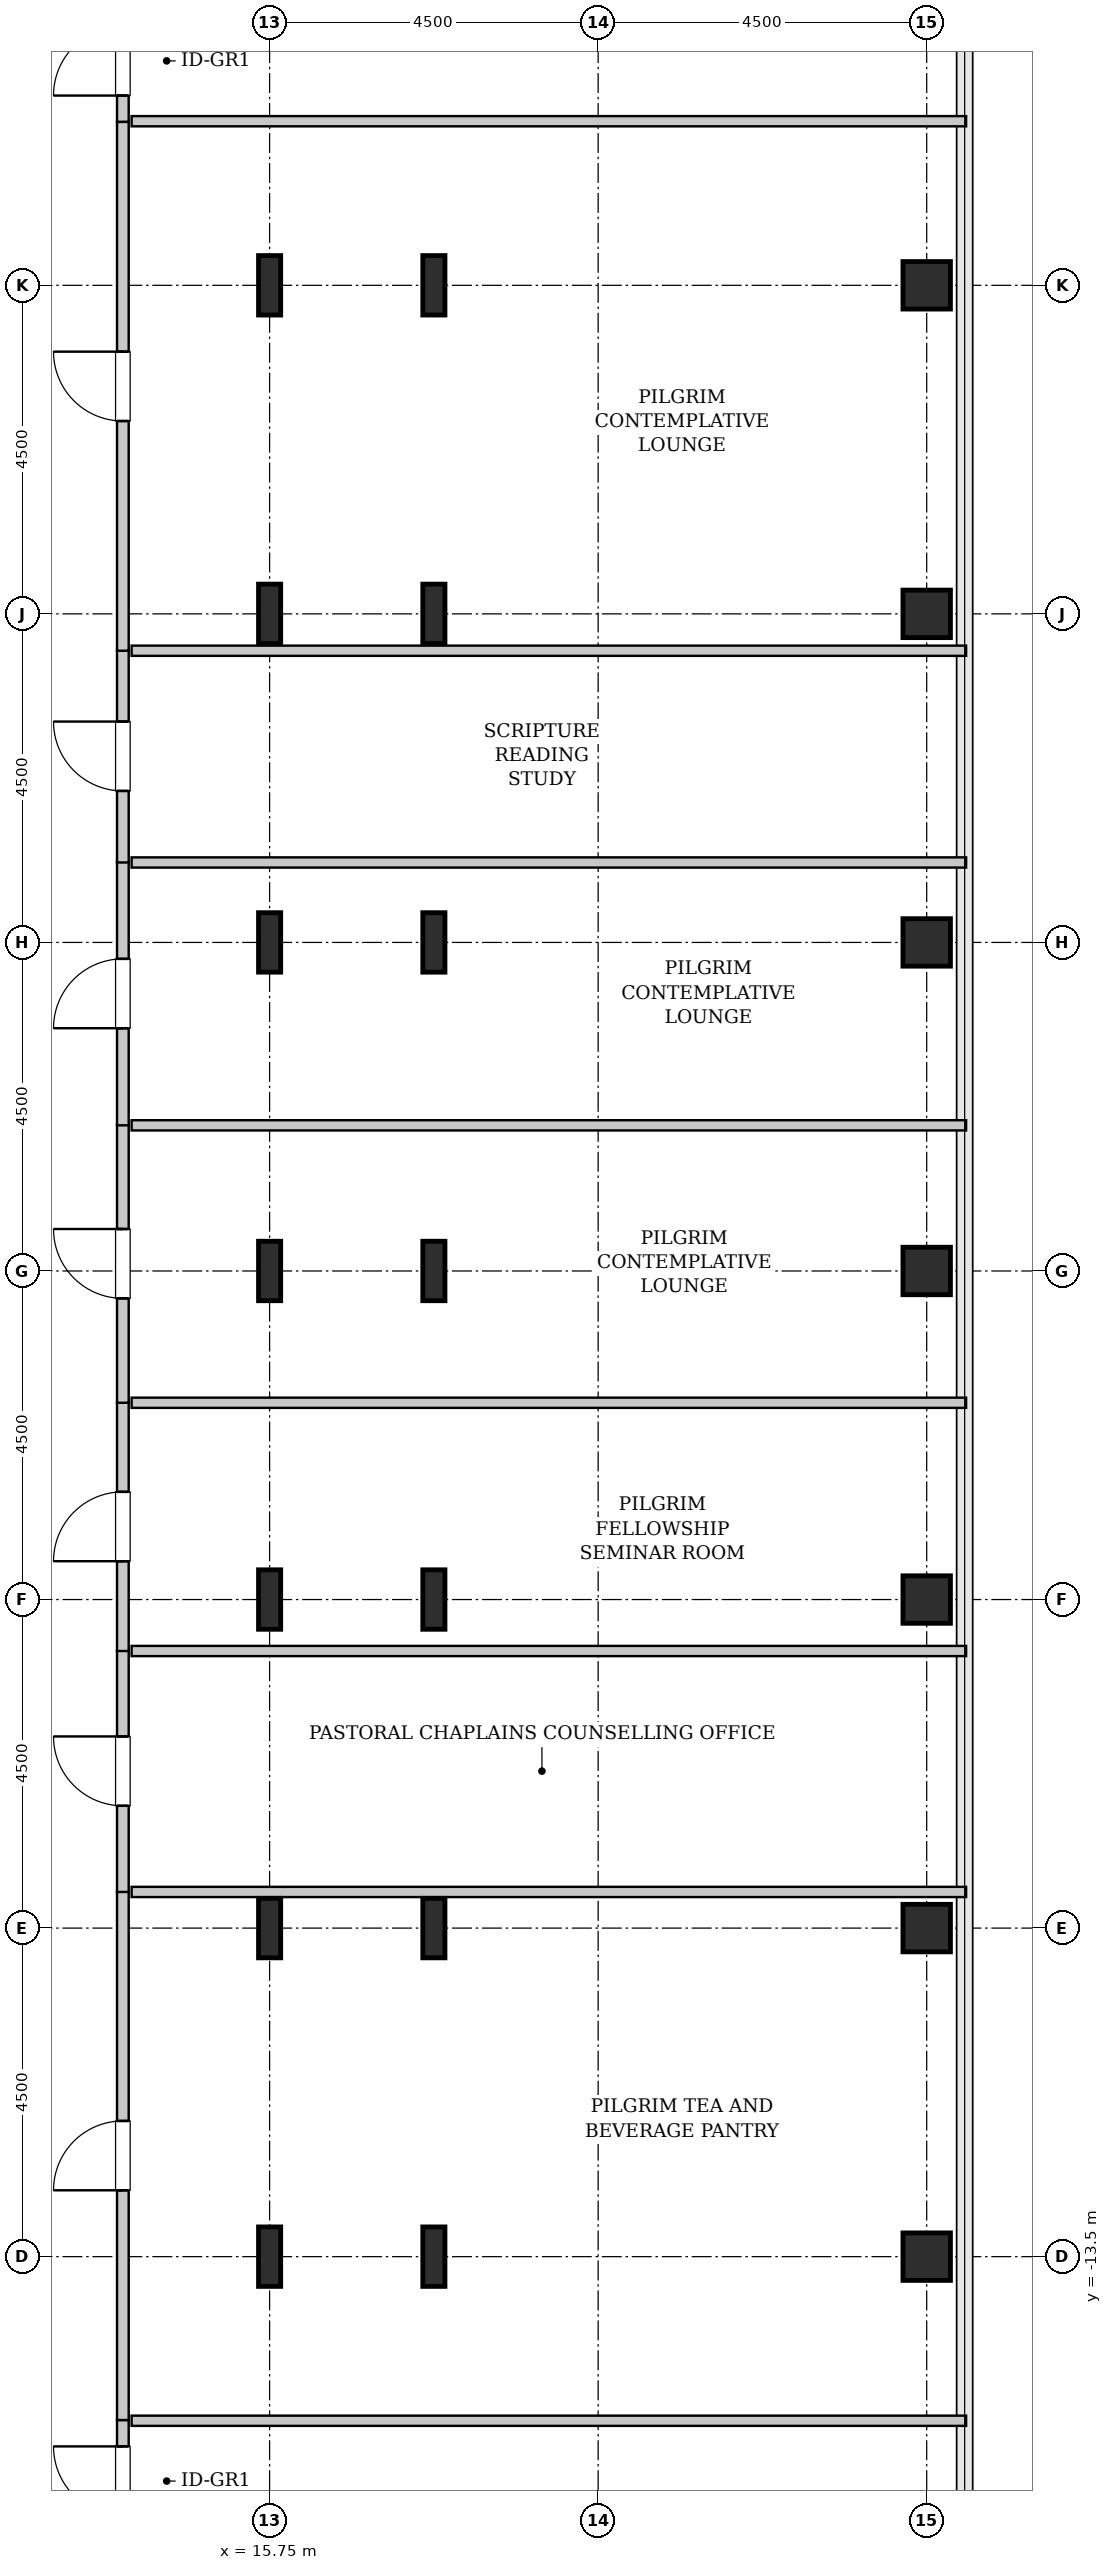
"""IFC4 building model, lengths in metres.
Left out: names, types, materials, properties, quantities, classifications, styles, units other than length and angle.
Written with IfcOpenShell. Run it as: python <this file> out.ifc"""

import sys

from ifc_helpers import new_model, si_unit, direction, frame, frame_2d, origin, origin_2d, place, context, subcontext, project, spatial, rectangle, hollow_rectangle, i_section, extrude, source, transform, mapped, element, fill, save


model = new_model("IFC4")
c1 = context("Model", 3, precision=1e-05, world=origin(), true_north=direction((0.0, 1.0)))
c2 = subcontext(c1, "Body", "Model", "MODEL_VIEW")
j1 = project(units=[si_unit("LENGTHUNIT", "METRE"), si_unit("PLANEANGLEUNIT", "RADIAN")], contexts=[c1])
p1 = place(None, origin())
s1 = spatial("IfcSite", under=j1, at=p1, CompositionType="ELEMENT")
p2 = place(p1, origin())
s2 = spatial("IfcBuilding", under=s1, at=p2, CompositionType="ELEMENT")
p3 = place(p2, frame((0.0, 0.0, 256.0)))
s3 = spatial("IfcBuildingStorey", under=s2, at=p3, CompositionType="ELEMENT", Elevation=256.0)
m1 = source(origin(), c2, "Body", "SweptSolid", [
    extrude(i_section(OverallWidth=0.303, OverallDepth=0.814, WebThickness=0.021, FlangeThickness=0.04, FilletRadius=0.03, at=origin_2d()), origin(), (0.0, 0.0, 1.0), 3.8),
])
for number, where, z_axis, x_axis in (
    (1, (15.75, -13.5, 0.0), (0.0, 0.0, 1.0), (1.0, 0.0, 0.0)),
    (2, (15.75, -9.0, 0.0), (0.0, 0.0, 1.0), (1.0, 0.0, 0.0)),
    (3, (15.75, -4.5, 0.0), (0.0, 0.0, 1.0), (1.0, 0.0, 0.0)),
    (4, (15.75, 0.0, 0.0), (0.0, 0.0, 1.0), (1.0, 0.0, 0.0)),
    (5, (15.75, 4.5, 0.0), (0.0, 0.0, 1.0), (1.0, 0.0, 0.0)),
    (6, (15.75, 9.0, 0.0), (0.0, 0.0, 1.0), (1.0, 0.0, 0.0)),
    (7, (15.75, 13.5, 0.0), (0.0, 0.0, 1.0), (1.0, 0.0, 0.0)),
    (8, (18.0, -13.5, 0.0), (0.0, 0.0, 1.0), (1.0, 0.0, 0.0)),
    (9, (18.0, -9.0, 0.0), (0.0, 0.0, 1.0), (1.0, 0.0, 0.0)),
    (10, (18.0, -4.5, 0.0), (0.0, 0.0, 1.0), (1.0, 0.0, 0.0)),
    (11, (18.0, 0.0, 0.0), (0.0, 0.0, 1.0), (1.0, 0.0, 0.0)),
    (12, (18.0, 4.5, 0.0), (0.0, 0.0, 1.0), (1.0, 0.0, 0.0)),
    (13, (18.0, 9.0, 0.0), (0.0, 0.0, 1.0), (1.0, 0.0, 0.0)),
    (14, (18.0, 13.5, 0.0), (0.0, 0.0, 1.0), (1.0, 0.0, 0.0)),
):
    element("IfcColumn", number, at=place(p3, frame(where, z_axis=z_axis, x_axis=x_axis)), inside=s3, PredefinedType="COLUMN", context=c2, shape_type="MappedRepresentation", body=[
        mapped(m1, transform((0.0, 0.0, 0.0), x_axis=(1.0, 0.0, 0.0), y_axis=(0.0, 1.0, 0.0), z_axis=(0.0, 0.0, 1.0), scale=1.0)),
    ])
m2 = source(origin(), c2, "Body", "SweptSolid", [
    extrude(hollow_rectangle(XDim=0.65, YDim=0.65, WallThickness=0.032, InnerFilletRadius=0.032, OuterFilletRadius=0.064, at=origin_2d()), origin(), (0.0, 0.0, 1.0), 3.8),
])
for number, where, z_axis, x_axis in (
    (15, (24.75, -13.5, 0.0), (0.0, 0.0, 1.0), (1.0, 0.0, 0.0)),
    (16, (24.75, -9.0, 0.0), (0.0, 0.0, 1.0), (1.0, 0.0, 0.0)),
    (17, (24.75, -4.5, 0.0), (0.0, 0.0, 1.0), (1.0, 0.0, 0.0)),
    (18, (24.75, 0.0, 0.0), (0.0, 0.0, 1.0), (1.0, 0.0, 0.0)),
    (19, (24.75, 4.5, 0.0), (0.0, 0.0, 1.0), (1.0, 0.0, 0.0)),
    (20, (24.75, 9.0, 0.0), (0.0, 0.0, 1.0), (1.0, 0.0, 0.0)),
    (21, (24.75, 13.5, 0.0), (0.0, 0.0, 1.0), (1.0, 0.0, 0.0)),
):
    element("IfcColumn", number, at=place(p3, frame(where, z_axis=z_axis, x_axis=x_axis)), inside=s3, PredefinedType="COLUMN", context=c2, shape_type="MappedRepresentation", body=[
        mapped(m2, transform((0.0, 0.0, 0.0), x_axis=(1.0, 0.0, 0.0), y_axis=(0.0, 1.0, 0.0), z_axis=(0.0, 0.0, 1.0), scale=1.0)),
    ])
m3 = source(origin(), c2, "Body", "SweptSolid", [
    extrude(rectangle(XDim=7.302, YDim=0.16, at=frame_2d((3.651, 0.0))), origin(), (0.0, 0.0, 1.0), 3.485),
])
p4 = place(p3, frame((13.74, -23.04, 0.0), z_axis=(0.0, 0.0, 1.0), x_axis=(0.0, 1.0, 0.0)))
e22 = element("IfcWall", 22, at=p4, inside=s3, PredefinedType="PARTITIONING", context=c2, shape_type="MappedRepresentation", body=[
    mapped(m3, transform((0.0, 0.0, 0.0), x_axis=(1.0, 0.0, 0.0), y_axis=(0.0, 1.0, 0.0), z_axis=(0.0, 0.0, 1.0), scale=1.0)),
])
p5 = place(p4, frame((5.991, 0.0, 0.0)))
e23 = element("IfcOpeningElement", 23, at=p5, cuts=e22, PredefinedType="OPENING", context=c2, shape_type="SweptSolid", body=[
    extrude(rectangle(XDim=0.95, YDim=2.1, at=frame_2d((0.475, 1.05))), frame((0.0, 0.09, 0.0), z_axis=(0.0, -1.0, 0.0), x_axis=(1.0, 0.0, 0.0)), (0.0, 0.0, 1.0), 0.18),
])
m4 = source(origin(), c2, "Body", "SweptSolid", [
    extrude(rectangle(XDim=11.43, YDim=0.14, at=frame_2d((5.715, 0.0))), origin(), (0.0, 0.0, 1.0), 3.485),
])
p6 = place(p3, frame((13.86, -15.748, 0.0), z_axis=(0.0, 0.0, 1.0), x_axis=(1.0, 0.0, 0.0)))
e24 = element("IfcWall", 24, at=p6, inside=s3, PredefinedType="PARTITIONING", context=c2, shape_type="MappedRepresentation", body=[
    mapped(m4, transform((0.0, 0.0, 0.0), x_axis=(1.0, 0.0, 0.0), y_axis=(0.0, 1.0, 0.0), z_axis=(0.0, 0.0, 1.0), scale=1.0)),
])
m5 = source(origin(), c2, "Body", "SweptSolid", [
    extrude(rectangle(XDim=7.242, YDim=0.16, at=frame_2d((3.621, 0.0))), origin(), (0.0, 0.0, 1.0), 3.485),
])
p7 = place(p3, frame((13.74, -15.738, 0.0), z_axis=(0.0, 0.0, 1.0), x_axis=(0.0, 1.0, 0.0)))
e25 = element("IfcWall", 25, at=p7, inside=s3, PredefinedType="PARTITIONING", context=c2, shape_type="MappedRepresentation", body=[
    mapped(m5, transform((0.0, 0.0, 0.0), x_axis=(1.0, 0.0, 0.0), y_axis=(0.0, 1.0, 0.0), z_axis=(0.0, 0.0, 1.0), scale=1.0)),
])
p8 = place(p7, frame((3.146, 0.0, 0.0)))
e26 = element("IfcOpeningElement", 26, at=p8, cuts=e25, PredefinedType="OPENING", context=c2, shape_type="SweptSolid", body=[
    extrude(rectangle(XDim=0.95, YDim=2.1, at=frame_2d((0.475, 1.05))), frame((0.0, 0.09, 0.0), z_axis=(0.0, -1.0, 0.0), x_axis=(1.0, 0.0, 0.0)), (0.0, 0.0, 1.0), 0.18),
])
m6 = source(origin(), c2, "Body", "SweptSolid", [
    extrude(rectangle(XDim=11.43, YDim=0.14, at=frame_2d((5.715, 0.0))), origin(), (0.0, 0.0, 1.0), 2.875),
])
p9 = place(p3, frame((13.86, -8.505, 0.0), z_axis=(0.0, 0.0, 1.0), x_axis=(1.0, 0.0, 0.0)))
e27 = element("IfcWall", 27, at=p9, inside=s3, PredefinedType="PARTITIONING", context=c2, shape_type="MappedRepresentation", body=[
    mapped(m6, transform((0.0, 0.0, 0.0), x_axis=(1.0, 0.0, 0.0), y_axis=(0.0, 1.0, 0.0), z_axis=(0.0, 0.0, 1.0), scale=1.0)),
])
m7 = source(origin(), c2, "Body", "SweptSolid", [
    extrude(rectangle(XDim=3.31, YDim=0.16, at=frame_2d((1.655, 0.0))), origin(), (0.0, 0.0, 1.0), 3.485),
])
p10 = place(p3, frame((13.74, -8.505, 0.0), z_axis=(0.0, 0.0, 1.0), x_axis=(0.0, 1.0, 0.0)))
e28 = element("IfcWall", 28, at=p10, inside=s3, PredefinedType="PARTITIONING", context=c2, shape_type="MappedRepresentation", body=[
    mapped(m7, transform((0.0, 0.0, 0.0), x_axis=(1.0, 0.0, 0.0), y_axis=(0.0, 1.0, 0.0), z_axis=(0.0, 0.0, 1.0), scale=1.0)),
])
p11 = place(p10, frame((1.18, 0.0, 0.0)))
e29 = element("IfcOpeningElement", 29, at=p11, cuts=e28, PredefinedType="OPENING", context=c2, shape_type="SweptSolid", body=[
    extrude(rectangle(XDim=0.95, YDim=2.1, at=frame_2d((0.475, 1.05))), frame((0.0, 0.09, 0.0), z_axis=(0.0, -1.0, 0.0), x_axis=(1.0, 0.0, 0.0)), (0.0, 0.0, 1.0), 0.18),
])
p12 = place(p3, frame((13.86, -5.205, 0.0), z_axis=(0.0, 0.0, 1.0), x_axis=(1.0, 0.0, 0.0)))
e30 = element("IfcWall", 30, at=p12, inside=s3, PredefinedType="PARTITIONING", context=c2, shape_type="MappedRepresentation", body=[
    mapped(m4, transform((0.0, 0.0, 0.0), x_axis=(1.0, 0.0, 0.0), y_axis=(0.0, 1.0, 0.0), z_axis=(0.0, 0.0, 1.0), scale=1.0)),
])
m8 = source(origin(), c2, "Body", "SweptSolid", [
    extrude(rectangle(XDim=3.41, YDim=0.16, at=frame_2d((1.705, 0.0))), origin(), (0.0, 0.0, 1.0), 3.485),
])
p13 = place(p3, frame((13.74, -5.205, 0.0), z_axis=(0.0, 0.0, 1.0), x_axis=(0.0, 1.0, 0.0)))
e31 = element("IfcWall", 31, at=p13, inside=s3, PredefinedType="PARTITIONING", context=c2, shape_type="MappedRepresentation", body=[
    mapped(m8, transform((0.0, 0.0, 0.0), x_axis=(1.0, 0.0, 0.0), y_axis=(0.0, 1.0, 0.0), z_axis=(0.0, 0.0, 1.0), scale=1.0)),
])
p14 = place(p13, frame((1.23, 0.0, 0.0)))
e32 = element("IfcOpeningElement", 32, at=p14, cuts=e31, PredefinedType="OPENING", context=c2, shape_type="SweptSolid", body=[
    extrude(rectangle(XDim=0.95, YDim=2.1, at=frame_2d((0.475, 1.05))), frame((0.0, 0.09, 0.0), z_axis=(0.0, -1.0, 0.0), x_axis=(1.0, 0.0, 0.0)), (0.0, 0.0, 1.0), 0.18),
])
p15 = place(p3, frame((13.86, -1.805, 0.0), z_axis=(0.0, 0.0, 1.0), x_axis=(1.0, 0.0, 0.0)))
e33 = element("IfcWall", 33, at=p15, inside=s3, PredefinedType="PARTITIONING", context=c2, shape_type="MappedRepresentation", body=[
    mapped(m4, transform((0.0, 0.0, 0.0), x_axis=(1.0, 0.0, 0.0), y_axis=(0.0, 1.0, 0.0), z_axis=(0.0, 0.0, 1.0), scale=1.0)),
])
m9 = source(origin(), c2, "Body", "SweptSolid", [
    extrude(rectangle(XDim=3.81, YDim=0.16, at=frame_2d((1.905, 0.0))), origin(), (0.0, 0.0, 1.0), 3.485),
])
p16 = place(p3, frame((13.74, -1.805, 0.0), z_axis=(0.0, 0.0, 1.0), x_axis=(0.0, 1.0, 0.0)))
e34 = element("IfcWall", 34, at=p16, inside=s3, PredefinedType="PARTITIONING", context=c2, shape_type="MappedRepresentation", body=[
    mapped(m9, transform((0.0, 0.0, 0.0), x_axis=(1.0, 0.0, 0.0), y_axis=(0.0, 1.0, 0.0), z_axis=(0.0, 0.0, 1.0), scale=1.0)),
])
p17 = place(p16, frame((1.43, 0.0, 0.0)))
e35 = element("IfcOpeningElement", 35, at=p17, cuts=e34, PredefinedType="OPENING", context=c2, shape_type="SweptSolid", body=[
    extrude(rectangle(XDim=0.95, YDim=2.1, at=frame_2d((0.475, 1.05))), frame((0.0, 0.09, 0.0), z_axis=(0.0, -1.0, 0.0), x_axis=(1.0, 0.0, 0.0)), (0.0, 0.0, 1.0), 0.18),
])
p18 = place(p3, frame((13.86, 1.995, 0.0), z_axis=(0.0, 0.0, 1.0), x_axis=(1.0, 0.0, 0.0)))
e36 = element("IfcWall", 36, at=p18, inside=s3, PredefinedType="PARTITIONING", context=c2, shape_type="MappedRepresentation", body=[
    mapped(m4, transform((0.0, 0.0, 0.0), x_axis=(1.0, 0.0, 0.0), y_axis=(0.0, 1.0, 0.0), z_axis=(0.0, 0.0, 1.0), scale=1.0)),
])
m10 = source(origin(), c2, "Body", "SweptSolid", [
    extrude(rectangle(XDim=3.61, YDim=0.16, at=frame_2d((1.805, 0.0))), origin(), (0.0, 0.0, 1.0), 3.485),
])
p19 = place(p3, frame((13.74, 1.995, 0.0), z_axis=(0.0, 0.0, 1.0), x_axis=(0.0, 1.0, 0.0)))
e37 = element("IfcWall", 37, at=p19, inside=s3, PredefinedType="PARTITIONING", context=c2, shape_type="MappedRepresentation", body=[
    mapped(m10, transform((0.0, 0.0, 0.0), x_axis=(1.0, 0.0, 0.0), y_axis=(0.0, 1.0, 0.0), z_axis=(0.0, 0.0, 1.0), scale=1.0)),
])
p20 = place(p19, frame((1.33, 0.0, 0.0)))
e38 = element("IfcOpeningElement", 38, at=p20, cuts=e37, PredefinedType="OPENING", context=c2, shape_type="SweptSolid", body=[
    extrude(rectangle(XDim=0.95, YDim=2.1, at=frame_2d((0.475, 1.05))), frame((0.0, 0.09, 0.0), z_axis=(0.0, -1.0, 0.0), x_axis=(1.0, 0.0, 0.0)), (0.0, 0.0, 1.0), 0.18),
])
p21 = place(p3, frame((13.86, 5.595, 0.0), z_axis=(0.0, 0.0, 1.0), x_axis=(1.0, 0.0, 0.0)))
e39 = element("IfcWall", 39, at=p21, inside=s3, PredefinedType="PARTITIONING", context=c2, shape_type="MappedRepresentation", body=[
    mapped(m4, transform((0.0, 0.0, 0.0), x_axis=(1.0, 0.0, 0.0), y_axis=(0.0, 1.0, 0.0), z_axis=(0.0, 0.0, 1.0), scale=1.0)),
])
m11 = source(origin(), c2, "Body", "SweptSolid", [
    extrude(rectangle(XDim=2.91, YDim=0.16, at=frame_2d((1.455, 0.0))), origin(), (0.0, 0.0, 1.0), 3.485),
])
p22 = place(p3, frame((13.74, 5.595, 0.0), z_axis=(0.0, 0.0, 1.0), x_axis=(0.0, 1.0, 0.0)))
e40 = element("IfcWall", 40, at=p22, inside=s3, PredefinedType="PARTITIONING", context=c2, shape_type="MappedRepresentation", body=[
    mapped(m11, transform((0.0, 0.0, 0.0), x_axis=(1.0, 0.0, 0.0), y_axis=(0.0, 1.0, 0.0), z_axis=(0.0, 0.0, 1.0), scale=1.0)),
])
p23 = place(p22, frame((0.98, 0.0, 0.0)))
e41 = element("IfcOpeningElement", 41, at=p23, cuts=e40, PredefinedType="OPENING", context=c2, shape_type="SweptSolid", body=[
    extrude(rectangle(XDim=0.95, YDim=2.1, at=frame_2d((0.475, 1.05))), frame((0.0, 0.09, 0.0), z_axis=(0.0, -1.0, 0.0), x_axis=(1.0, 0.0, 0.0)), (0.0, 0.0, 1.0), 0.18),
])
p24 = place(p3, frame((13.86, 8.495, 0.0), z_axis=(0.0, 0.0, 1.0), x_axis=(1.0, 0.0, 0.0)))
e42 = element("IfcWall", 42, at=p24, inside=s3, PredefinedType="PARTITIONING", context=c2, shape_type="MappedRepresentation", body=[
    mapped(m6, transform((0.0, 0.0, 0.0), x_axis=(1.0, 0.0, 0.0), y_axis=(0.0, 1.0, 0.0), z_axis=(0.0, 0.0, 1.0), scale=1.0)),
])
p25 = place(p3, frame((13.74, 15.738, 0.0), z_axis=(0.0, 0.0, 1.0), x_axis=(0.0, 1.0, 0.0)))
e43 = element("IfcWall", 43, at=p25, inside=s3, PredefinedType="PARTITIONING", context=c2, shape_type="MappedRepresentation", body=[
    mapped(m3, transform((0.0, 0.0, 0.0), x_axis=(1.0, 0.0, 0.0), y_axis=(0.0, 1.0, 0.0), z_axis=(0.0, 0.0, 1.0), scale=1.0)),
])
p26 = place(p25, frame((0.361, 0.0, 0.0)))
e44 = element("IfcOpeningElement", 44, at=p26, cuts=e43, PredefinedType="OPENING", context=c2, shape_type="SweptSolid", body=[
    extrude(rectangle(XDim=0.95, YDim=2.1, at=frame_2d((0.475, 1.05))), frame((0.0, 0.09, 0.0), z_axis=(0.0, -1.0, 0.0), x_axis=(1.0, 0.0, 0.0)), (0.0, 0.0, 1.0), 0.18),
])
p27 = place(p3, frame((13.86, 15.748, 0.0), z_axis=(0.0, 0.0, 1.0), x_axis=(1.0, 0.0, 0.0)))
e45 = element("IfcWall", 45, at=p27, inside=s3, PredefinedType="PARTITIONING", context=c2, shape_type="MappedRepresentation", body=[
    mapped(m4, transform((0.0, 0.0, 0.0), x_axis=(1.0, 0.0, 0.0), y_axis=(0.0, 1.0, 0.0), z_axis=(0.0, 0.0, 1.0), scale=1.0)),
])
p28 = place(p3, frame((13.74, 8.495, 0.0), z_axis=(0.0, 0.0, 1.0), x_axis=(0.0, 1.0, 0.0)))
e46 = element("IfcWall", 46, at=p28, inside=s3, PredefinedType="PARTITIONING", context=c2, shape_type="MappedRepresentation", body=[
    mapped(m5, transform((0.0, 0.0, 0.0), x_axis=(1.0, 0.0, 0.0), y_axis=(0.0, 1.0, 0.0), z_axis=(0.0, 0.0, 1.0), scale=1.0)),
])
p29 = place(p28, frame((3.146, 0.0, 0.0)))
e47 = element("IfcOpeningElement", 47, at=p29, cuts=e46, PredefinedType="OPENING", context=c2, shape_type="SweptSolid", body=[
    extrude(rectangle(XDim=0.95, YDim=2.1, at=frame_2d((0.475, 1.05))), frame((0.0, 0.09, 0.0), z_axis=(0.0, -1.0, 0.0), x_axis=(1.0, 0.0, 0.0)), (0.0, 0.0, 1.0), 0.18),
])
m12 = source(origin(), c2, "Body", "SweptSolid", [
    extrude(rectangle(XDim=0.95, YDim=2.1, at=frame_2d((0.475, 1.05))), frame((0.0, 0.025, 0.0), z_axis=(0.0, -1.0, 0.0), x_axis=(1.0, 0.0, 0.0)), (0.0, 0.0, 1.0), 0.05),
])
p30 = place(p5, origin())
e48 = element("IfcDoor", 48, at=p30, inside=s3, OperationType="SINGLE_SWING_RIGHT", PredefinedType="DOOR", context=c2, shape_type="MappedRepresentation", body=[
    mapped(m12, transform((0.0, 0.0, 0.0), x_axis=(1.0, 0.0, 0.0), y_axis=(0.0, 1.0, 0.0), z_axis=(0.0, 0.0, 1.0), scale=1.0)),
])
fill(e23, e48)
p31 = place(p8, origin())
e49 = element("IfcDoor", 49, at=p31, inside=s3, OperationType="SINGLE_SWING_LEFT", PredefinedType="DOOR", context=c2, shape_type="MappedRepresentation", body=[
    mapped(m12, transform((0.0, 0.0, 0.0), x_axis=(1.0, 0.0, 0.0), y_axis=(0.0, 1.0, 0.0), z_axis=(0.0, 0.0, 1.0), scale=1.0)),
])
fill(e26, e49)
p32 = place(p11, origin())
e50 = element("IfcDoor", 50, at=p32, inside=s3, OperationType="SINGLE_SWING_RIGHT", PredefinedType="DOOR", context=c2, shape_type="MappedRepresentation", body=[
    mapped(m12, transform((0.0, 0.0, 0.0), x_axis=(1.0, 0.0, 0.0), y_axis=(0.0, 1.0, 0.0), z_axis=(0.0, 0.0, 1.0), scale=1.0)),
])
fill(e29, e50)
p33 = place(p14, origin())
e51 = element("IfcDoor", 51, at=p33, inside=s3, OperationType="SINGLE_SWING_LEFT", PredefinedType="DOOR", context=c2, shape_type="MappedRepresentation", body=[
    mapped(m12, transform((0.0, 0.0, 0.0), x_axis=(1.0, 0.0, 0.0), y_axis=(0.0, 1.0, 0.0), z_axis=(0.0, 0.0, 1.0), scale=1.0)),
])
fill(e32, e51)
p34 = place(p17, origin())
e52 = element("IfcDoor", 52, at=p34, inside=s3, OperationType="SINGLE_SWING_RIGHT", PredefinedType="DOOR", context=c2, shape_type="MappedRepresentation", body=[
    mapped(m12, transform((0.0, 0.0, 0.0), x_axis=(1.0, 0.0, 0.0), y_axis=(0.0, 1.0, 0.0), z_axis=(0.0, 0.0, 1.0), scale=1.0)),
])
fill(e35, e52)
p35 = place(p20, origin())
e53 = element("IfcDoor", 53, at=p35, inside=s3, OperationType="SINGLE_SWING_LEFT", PredefinedType="DOOR", context=c2, shape_type="MappedRepresentation", body=[
    mapped(m12, transform((0.0, 0.0, 0.0), x_axis=(1.0, 0.0, 0.0), y_axis=(0.0, 1.0, 0.0), z_axis=(0.0, 0.0, 1.0), scale=1.0)),
])
fill(e38, e53)
p36 = place(p23, origin())
e54 = element("IfcDoor", 54, at=p36, inside=s3, OperationType="SINGLE_SWING_RIGHT", PredefinedType="DOOR", context=c2, shape_type="MappedRepresentation", body=[
    mapped(m12, transform((0.0, 0.0, 0.0), x_axis=(1.0, 0.0, 0.0), y_axis=(0.0, 1.0, 0.0), z_axis=(0.0, 0.0, 1.0), scale=1.0)),
])
fill(e41, e54)
p37 = place(p26, origin())
e55 = element("IfcDoor", 55, at=p37, inside=s3, OperationType="SINGLE_SWING_LEFT", PredefinedType="DOOR", context=c2, shape_type="MappedRepresentation", body=[
    mapped(m12, transform((0.0, 0.0, 0.0), x_axis=(1.0, 0.0, 0.0), y_axis=(0.0, 1.0, 0.0), z_axis=(0.0, 0.0, 1.0), scale=1.0)),
])
fill(e44, e55)
p38 = place(p29, origin())
e56 = element("IfcDoor", 56, at=p38, inside=s3, OperationType="SINGLE_SWING_RIGHT", PredefinedType="DOOR", context=c2, shape_type="MappedRepresentation", body=[
    mapped(m12, transform((0.0, 0.0, 0.0), x_axis=(1.0, 0.0, 0.0), y_axis=(0.0, 1.0, 0.0), z_axis=(0.0, 0.0, 1.0), scale=1.0)),
])
fill(e47, e56)
save(model, sys.argv[1])
